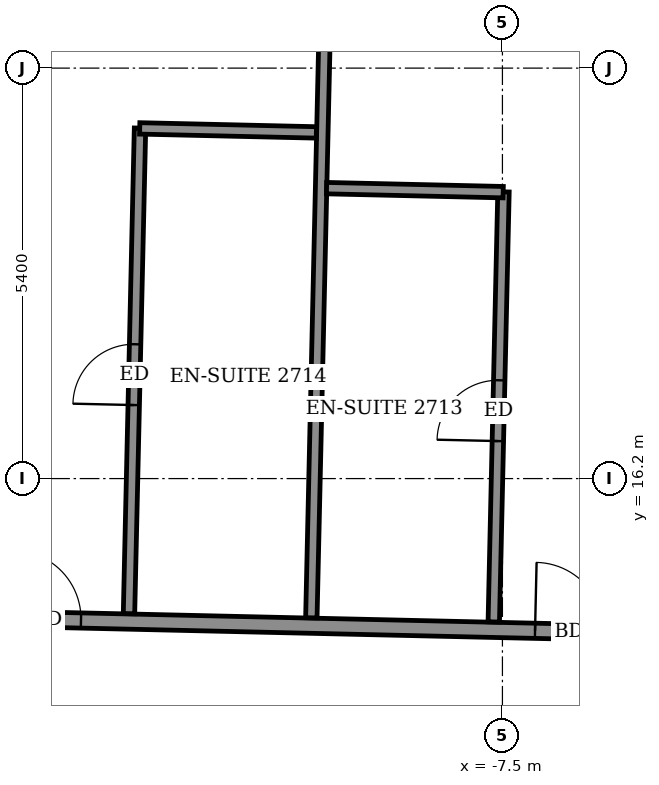
"""IFC4 building model, lengths in metres.
Left out: names, types, materials, properties, quantities, classifications, styles, units other than length and angle.
Written with IfcOpenShell. Run it as: python <this file> out.ifc"""

import sys

from ifc_helpers import new_model, si_unit, direction, frame, frame_2d, origin, place, context, subcontext, project, spatial, rectangle, extrude, element, fill, save


model = new_model("IFC4")
c1 = context("Model", 3, precision=1e-05, world=origin(), true_north=direction((0.0, 1.0)))
c2 = subcontext(c1, "Body", "Model", "MODEL_VIEW")
j1 = project(units=[si_unit("LENGTHUNIT", "METRE"), si_unit("PLANEANGLEUNIT", "RADIAN")], contexts=[c1])
p1 = place(None, origin())
s1 = spatial("IfcSite", under=j1, at=p1, CompositionType="ELEMENT")
p2 = place(p1, origin())
s2 = spatial("IfcBuilding", under=s1, at=p2, CompositionType="ELEMENT")
p3 = place(p2, frame((0.0, 0.0, 109.1)))
s3 = spatial("IfcBuildingStorey", under=s2, at=p3, CompositionType="ELEMENT", Elevation=109.1)
p4 = place(p3, frame((-26.316, 14.634, 0.0), z_axis=(0.0, 0.0, 1.0), x_axis=(0.999742734556, -0.02268181435, 0.0)))
e1 = element("IfcWall", 1, at=p4, inside=s3, PredefinedType="PARTITIONING", context=c2, shape_type="SweptSolid", body=[
    extrude(rectangle(XDim=50.708, YDim=0.2, at=frame_2d((25.354, 0.0))), origin(), (0.0, 0.0, 1.0), 3.05),
])
p5 = place(p4, frame((48.229, 0.0, 0.0)))
e2 = element("IfcOpeningElement", 2, at=p5, cuts=e1, PredefinedType="OPENING", context=c2, shape_type="SweptSolid", body=[
    extrude(rectangle(XDim=1.0, YDim=2.1, at=frame_2d((0.5, 1.05))), frame((0.0, 0.11, 0.0), z_axis=(0.0, -1.0, 0.0), x_axis=(1.0, 0.0, 0.0)), (0.0, 0.0, 1.0), 0.22),
])
p6 = place(p4, frame((43.6, 0.0, 0.0)))
e3 = element("IfcOpeningElement", 3, at=p6, cuts=e1, PredefinedType="OPENING", context=c2, shape_type="SweptSolid", body=[
    extrude(rectangle(XDim=0.9, YDim=2.1, at=frame_2d((0.45, 1.05))), frame((0.0, 0.11, 0.0), z_axis=(0.0, -1.0, 0.0), x_axis=(1.0, 0.0, 0.0)), (0.0, 0.0, 1.0), 0.22),
])
p7 = place(p4, frame((38.925, 0.0, 0.0)))
e4 = element("IfcOpeningElement", 4, at=p7, cuts=e1, PredefinedType="OPENING", context=c2, shape_type="SweptSolid", body=[
    extrude(rectangle(XDim=0.9, YDim=2.1, at=frame_2d((0.45, 1.05))), frame((0.0, 0.11, 0.0), z_axis=(0.0, -1.0, 0.0), x_axis=(1.0, 0.0, 0.0)), (0.0, 0.0, 1.0), 0.22),
])
p8 = place(p4, frame((36.9, 0.0, 0.0)))
e5 = element("IfcOpeningElement", 5, at=p8, cuts=e1, PredefinedType="OPENING", context=c2, shape_type="SweptSolid", body=[
    extrude(rectangle(XDim=0.9, YDim=2.1, at=frame_2d((0.45, 1.05))), frame((0.0, 0.11, 0.0), z_axis=(0.0, -1.0, 0.0), x_axis=(1.0, 0.0, 0.0)), (0.0, 0.0, 1.0), 0.22),
])
p9 = place(p4, frame((29.975, 0.0, 0.0)))
e6 = element("IfcOpeningElement", 6, at=p9, cuts=e1, PredefinedType="OPENING", context=c2, shape_type="SweptSolid", body=[
    extrude(rectangle(XDim=0.9, YDim=2.1, at=frame_2d((0.45, 1.05))), frame((0.0, 0.11, 0.0), z_axis=(0.0, -1.0, 0.0), x_axis=(1.0, 0.0, 0.0)), (0.0, 0.0, 1.0), 0.22),
])
p10 = place(p4, frame((27.9, 0.0, 0.0)))
e7 = element("IfcOpeningElement", 7, at=p10, cuts=e1, PredefinedType="OPENING", context=c2, shape_type="SweptSolid", body=[
    extrude(rectangle(XDim=0.9, YDim=2.1, at=frame_2d((0.45, 1.05))), frame((0.0, 0.11, 0.0), z_axis=(0.0, -1.0, 0.0), x_axis=(1.0, 0.0, 0.0)), (0.0, 0.0, 1.0), 0.22),
])
p11 = place(p4, frame((21.175, 0.0, 0.0)))
e8 = element("IfcOpeningElement", 8, at=p11, cuts=e1, PredefinedType="OPENING", context=c2, shape_type="SweptSolid", body=[
    extrude(rectangle(XDim=0.9, YDim=2.1, at=frame_2d((0.45, 1.05))), frame((0.0, 0.11, 0.0), z_axis=(0.0, -1.0, 0.0), x_axis=(1.0, 0.0, 0.0)), (0.0, 0.0, 1.0), 0.22),
])
p12 = place(p4, frame((19.25, 0.0, 0.0)))
e9 = element("IfcOpeningElement", 9, at=p12, cuts=e1, PredefinedType="OPENING", context=c2, shape_type="SweptSolid", body=[
    extrude(rectangle(XDim=0.9, YDim=2.1, at=frame_2d((0.45, 1.05))), frame((0.0, 0.11, 0.0), z_axis=(0.0, -1.0, 0.0), x_axis=(1.0, 0.0, 0.0)), (0.0, 0.0, 1.0), 0.22),
])
p13 = place(p4, frame((12.375, 0.0, 0.0)))
e10 = element("IfcOpeningElement", 10, at=p13, cuts=e1, PredefinedType="OPENING", context=c2, shape_type="SweptSolid", body=[
    extrude(rectangle(XDim=0.9, YDim=2.1, at=frame_2d((0.45, 1.05))), frame((0.0, 0.11, 0.0), z_axis=(0.0, -1.0, 0.0), x_axis=(1.0, 0.0, 0.0)), (0.0, 0.0, 1.0), 0.22),
])
p14 = place(p4, frame((10.225, 0.0, 0.0)))
e11 = element("IfcOpeningElement", 11, at=p14, cuts=e1, PredefinedType="OPENING", context=c2, shape_type="SweptSolid", body=[
    extrude(rectangle(XDim=0.9, YDim=2.1, at=frame_2d((0.45, 1.05))), frame((0.0, 0.11, 0.0), z_axis=(0.0, -1.0, 0.0), x_axis=(1.0, 0.0, 0.0)), (0.0, 0.0, 1.0), 0.22),
])
p15 = place(p4, frame((0.85, 0.0, 0.0)))
e12 = element("IfcOpeningElement", 12, at=p15, cuts=e1, PredefinedType="OPENING", context=c2, shape_type="SweptSolid", body=[
    extrude(rectangle(XDim=1.0, YDim=2.1, at=frame_2d((0.5, 1.05))), frame((0.0, 0.11, 0.0), z_axis=(0.0, -1.0, 0.0), x_axis=(1.0, 0.0, 0.0)), (0.0, 0.0, 1.0), 0.22),
])
p16 = place(p4, frame((5.55, 0.0, 0.0)))
e13 = element("IfcOpeningElement", 13, at=p16, cuts=e1, PredefinedType="OPENING", context=c2, shape_type="SweptSolid", body=[
    extrude(rectangle(XDim=0.9, YDim=2.1, at=frame_2d((0.45, 1.05))), frame((0.0, 0.11, 0.0), z_axis=(0.0, -1.0, 0.0), x_axis=(1.0, 0.0, 0.0)), (0.0, 0.0, 1.0), 0.22),
])
p17 = place(p3, frame((-12.413, 14.423, 0.0), z_axis=(0.0, 0.0, 1.0), x_axis=(0.022696235044, 0.99974240728, 0.0)))
e14 = element("IfcWall", 14, at=p17, inside=s3, PredefinedType="PARTITIONING", context=c2, shape_type="SweptSolid", body=[
    extrude(rectangle(XDim=6.39, YDim=0.15, at=frame_2d((3.195, 0.0))), origin(), (0.0, 0.0, 1.0), 3.05),
])
p18 = place(p17, frame((2.745, 0.0, 0.0)))
e15 = element("IfcOpeningElement", 15, at=p18, cuts=e14, PredefinedType="OPENING", context=c2, shape_type="SweptSolid", body=[
    extrude(rectangle(XDim=0.8, YDim=2.1, at=frame_2d((0.4, 1.05))), frame((0.0, 0.085, 0.0), z_axis=(0.0, -1.0, 0.0), x_axis=(1.0, 0.0, 0.0)), (0.0, 0.0, 1.0), 0.17),
])
p19 = place(p3, frame((-10.014, 14.368, 0.0), z_axis=(0.0, 0.0, 1.0), x_axis=(0.022662905301, 0.999743163379, 0.0)))
e16 = element("IfcWall", 16, at=p19, inside=s3, PredefinedType="PARTITIONING", context=c2, shape_type="SweptSolid", body=[
    extrude(rectangle(XDim=11.376, YDim=0.15, at=frame_2d((5.688, 0.0))), origin(), (0.0, 0.0, 1.0), 2.55),
])
p20 = place(p3, frame((-7.614, 14.314, 0.0), z_axis=(0.0, 0.0, 1.0), x_axis=(0.022604794261, 0.999744478993, 0.0)))
e17 = element("IfcWall", 17, at=p20, inside=s3, PredefinedType="PARTITIONING", context=c2, shape_type="SweptSolid", body=[
    extrude(rectangle(XDim=5.659, YDim=0.15, at=frame_2d((2.83, 0.0))), origin(), (0.0, 0.0, 1.0), 3.05),
])
p21 = place(p20, frame((2.38, 0.0, 0.0)))
e18 = element("IfcOpeningElement", 18, at=p21, cuts=e17, PredefinedType="OPENING", context=c2, shape_type="SweptSolid", body=[
    extrude(rectangle(XDim=0.8, YDim=2.1, at=frame_2d((0.4, 1.05))), frame((0.0, 0.085, 0.0), z_axis=(0.0, -1.0, 0.0), x_axis=(1.0, 0.0, 0.0)), (0.0, 0.0, 1.0), 0.17),
])
for number, where, z_axis, x_axis in (
    (19, (-9.814, 20.021, 0.0), (0.0, 0.0, 1.0), (1.0, -0.023, 0.0)),
    (20, (-12.272, 20.807, 0.0), (0.0, 0.0, 1.0), (1.0, -0.023, 0.0)),
):
    element("IfcWall", number, at=place(p3, frame(where, z_axis=z_axis, x_axis=x_axis)), inside=s3, PredefinedType="PARTITIONING", context=c2, shape_type="SweptSolid", body=[
        extrude(rectangle(XDim=2.324, YDim=0.15, at=frame_2d((1.162, 0.0))), origin(), (0.0, 0.0, 1.0), 3.05),
    ])
p22 = place(p12, origin())
e21 = element("IfcDoor", 21, at=p22, inside=s3, OperationType="SINGLE_SWING_LEFT", PredefinedType="DOOR", context=c2, shape_type="SweptSolid", body=[
    extrude(rectangle(XDim=0.9, YDim=2.1, at=frame_2d((0.45, 1.05))), frame((0.0, 0.025, 0.0), z_axis=(0.0, -1.0, 0.0), x_axis=(1.0, 0.0, 0.0)), (0.0, 0.0, 1.0), 0.05),
])
fill(e9, e21)
p23 = place(p21, origin())
e22 = element("IfcDoor", 22, at=p23, inside=s3, OperationType="SINGLE_SWING_LEFT", PredefinedType="DOOR", context=c2, shape_type="SweptSolid", body=[
    extrude(rectangle(XDim=0.8, YDim=2.1, at=frame_2d((0.4, 1.05))), frame((0.0, 0.025, 0.0), z_axis=(0.0, -1.0, 0.0), x_axis=(1.0, 0.0, 0.0)), (0.0, 0.0, 1.0), 0.05),
])
fill(e18, e22)
p24 = place(p13, origin())
e23 = element("IfcDoor", 23, at=p24, inside=s3, OperationType="SINGLE_SWING_RIGHT", PredefinedType="DOOR", context=c2, shape_type="SweptSolid", body=[
    extrude(rectangle(XDim=0.9, YDim=2.1, at=frame_2d((0.45, 1.05))), frame((0.0, 0.025, 0.0), z_axis=(0.0, -1.0, 0.0), x_axis=(1.0, 0.0, 0.0)), (0.0, 0.0, 1.0), 0.05),
])
fill(e10, e23)
p25 = place(p18, origin())
e24 = element("IfcDoor", 24, at=p25, inside=s3, OperationType="SINGLE_SWING_RIGHT", PredefinedType="DOOR", context=c2, shape_type="SweptSolid", body=[
    extrude(rectangle(XDim=0.8, YDim=2.1, at=frame_2d((0.4, 1.05))), frame((0.0, 0.025, 0.0), z_axis=(0.0, -1.0, 0.0), x_axis=(1.0, 0.0, 0.0)), (0.0, 0.0, 1.0), 0.05),
])
fill(e15, e24)
save(model, sys.argv[1])
